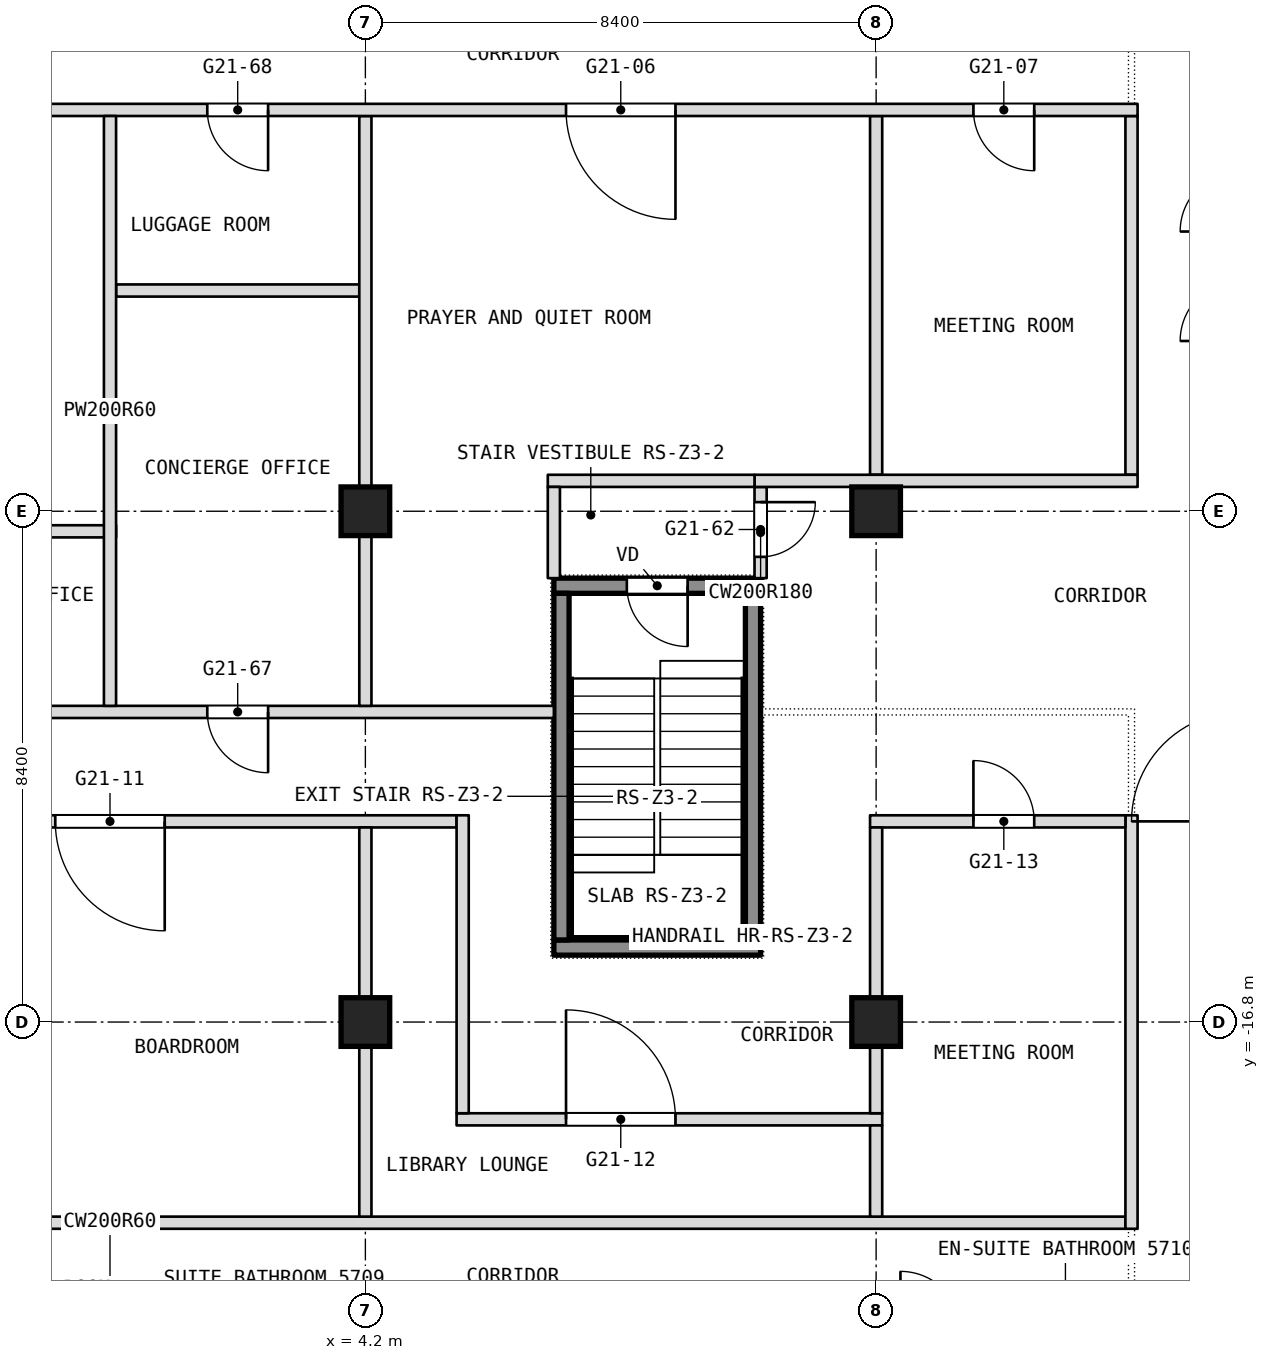
"""IFC4 building model, lengths in metres.
Left out: names, types, materials, properties, quantities, classifications, styles, units other than length and angle.
Written with IfcOpenShell. Run it as: python <this file> out.ifc"""

import sys

from ifc_helpers import new_model, si_unit, direction, frame, frame_2d, origin, origin_2d, place, context, subcontext, project, spatial, rectangle, extrude, element, fill, save


model = new_model("IFC4")
c1 = context("Model", 3, precision=1e-05, world=origin(), true_north=direction((0.0, 1.0)))
c2 = subcontext(c1, "Body", "Model", "MODEL_VIEW")
j1 = project(units=[si_unit("LENGTHUNIT", "METRE"), si_unit("PLANEANGLEUNIT", "RADIAN")], contexts=[c1])
p1 = place(None, origin())
s1 = spatial("IfcSite", under=j1, at=p1, CompositionType="ELEMENT")
p2 = place(p1, origin())
s2 = spatial("IfcBuilding", under=s1, at=p2, CompositionType="ELEMENT")
p3 = place(p2, frame((0.0, 0.0, 241.7)))
s3 = spatial("IfcBuildingStorey", under=s2, at=p3, CompositionType="ELEMENT", Elevation=241.7)
for number, where, z_axis, x_axis in (
    (1, (4.2, -16.8, 0.0), (0.0, 0.0, 1.0), (1.0, 0.0, 0.0)),
    (2, (4.2, -8.4, 0.0), (0.0, 0.0, 1.0), (1.0, 0.0, 0.0)),
    (3, (12.6, -16.8, 0.0), (0.0, 0.0, 1.0), (1.0, 0.0, 0.0)),
    (4, (12.6, -8.4, 0.0), (0.0, 0.0, 1.0), (1.0, 0.0, 0.0)),
):
    element("IfcColumn", number, at=place(p3, frame(where, z_axis=z_axis, x_axis=x_axis)), inside=s3, PredefinedType="COLUMN", context=c2, shape_type="SweptSolid", body=[
        extrude(rectangle(XDim=0.8, YDim=0.8, at=origin_2d()), origin(), (0.0, 0.0, 1.0), 3.6),
    ])
p4 = place(p3, frame((-16.7, -20.1, 0.0), z_axis=(0.0, 0.0, 1.0), x_axis=(1.0, 0.0, 0.0)))
e5 = element("IfcWall", 5, at=p4, inside=s3, PredefinedType="PARTITIONING", context=c2, shape_type="SweptSolid", body=[
    extrude(rectangle(XDim=33.4, YDim=0.2, at=frame_2d((16.7, 0.0))), origin(), (0.0, 0.0, 1.0), 3.34),
])
p5 = place(p3, frame((5.7, -18.4, 0.0), z_axis=(0.0, 0.0, 1.0), x_axis=(1.0, 0.0, 0.0)))
e6 = element("IfcWall", 6, at=p5, inside=s3, PredefinedType="PARTITIONING", context=c2, shape_type="SweptSolid", body=[
    extrude(rectangle(XDim=7.0, YDim=0.2, at=frame_2d((3.5, 0.0))), origin(), (0.0, 0.0, 1.0), 3.34),
])
p6 = place(p5, frame((1.8, 0.0, 0.0)))
e7 = element("IfcOpeningElement", 7, at=p6, cuts=e6, PredefinedType="OPENING", context=c2, shape_type="SweptSolid", body=[
    extrude(rectangle(XDim=1.8, YDim=2.1, at=frame_2d((0.9, 1.05))), frame((0.0, 0.1, 0.0), z_axis=(0.0, -1.0, 0.0), x_axis=(1.0, 0.0, 0.0)), (0.0, 0.0, 1.0), 0.2),
])
p7 = place(p3, frame((16.8, -20.2, 0.0), z_axis=(0.0, 0.0, 1.0), x_axis=(0.0, 1.0, 0.0)))
e8 = element("IfcWall", 8, at=p7, inside=s3, PredefinedType="PARTITIONING", context=c2, shape_type="SweptSolid", body=[
    extrude(rectangle(XDim=6.8, YDim=0.2, at=frame_2d((3.4, 0.0))), origin(), (0.0, 0.0, 1.0), 3.34),
])
p8 = place(p3, frame((16.8, -7.8, 0.0), z_axis=(0.0, 0.0, 1.0), x_axis=(0.0, 1.0, 0.0)))
e9 = element("IfcWall", 9, at=p8, inside=s3, PredefinedType="PARTITIONING", context=c2, shape_type="SweptSolid", body=[
    extrude(rectangle(XDim=5.9, YDim=0.2, at=frame_2d((2.95, 0.0))), origin(), (0.0, 0.0, 1.0), 3.34),
])
p9 = place(p3, frame((-5.9, -13.5, 0.0), z_axis=(0.0, 0.0, 1.0), x_axis=(1.0, 0.0, 0.0)))
e10 = element("IfcWall", 10, at=p9, inside=s3, PredefinedType="PARTITIONING", context=c2, shape_type="SweptSolid", body=[
    extrude(rectangle(XDim=11.6, YDim=0.2, at=frame_2d((5.8, 0.0))), origin(), (0.0, 0.0, 1.0), 3.34),
])
p10 = place(p9, frame((5.0, 0.0, 0.0)))
e11 = element("IfcOpeningElement", 11, at=p10, cuts=e10, PredefinedType="OPENING", context=c2, shape_type="SweptSolid", body=[
    extrude(rectangle(XDim=1.8, YDim=2.1, at=frame_2d((0.9, 1.05))), frame((0.0, 0.1, 0.0), z_axis=(0.0, -1.0, 0.0), x_axis=(1.0, 0.0, 0.0)), (0.0, 0.0, 1.0), 0.2),
])
p11 = place(p3, frame((12.5, -13.5, 0.0), z_axis=(0.0, 0.0, 1.0), x_axis=(1.0, 0.0, 0.0)))
e12 = element("IfcWall", 12, at=p11, inside=s3, PredefinedType="PARTITIONING", context=c2, shape_type="SweptSolid", body=[
    extrude(rectangle(XDim=4.2, YDim=0.2, at=frame_2d((2.1, 0.0))), origin(), (0.0, 0.0, 1.0), 3.34),
])
p12 = place(p11, frame((1.7, 0.0, 0.0)))
e13 = element("IfcOpeningElement", 13, at=p12, cuts=e12, PredefinedType="OPENING", context=c2, shape_type="SweptSolid", body=[
    extrude(rectangle(XDim=1.0, YDim=2.1, at=frame_2d((0.5, 1.05))), frame((0.0, 0.1, 0.0), z_axis=(0.0, -1.0, 0.0), x_axis=(1.0, 0.0, 0.0)), (0.0, 0.0, 1.0), 0.2),
])
p13 = place(p3, frame((12.6, -20.0, 0.0), z_axis=(0.0, 0.0, 1.0), x_axis=(0.0, 1.0, 0.0)))
e14 = element("IfcWall", 14, at=p13, inside=s3, PredefinedType="PARTITIONING", context=c2, shape_type="SweptSolid", body=[
    extrude(rectangle(XDim=1.5, YDim=0.2, at=frame_2d((0.75, 0.0))), origin(), (0.0, 0.0, 1.0), 3.34),
])
p14 = place(p3, frame((12.6, -7.8, 0.0), z_axis=(0.0, 0.0, 1.0), x_axis=(0.0, 1.0, 0.0)))
e15 = element("IfcWall", 15, at=p14, inside=s3, PredefinedType="PARTITIONING", context=c2, shape_type="SweptSolid", body=[
    extrude(rectangle(XDim=5.9, YDim=0.2, at=frame_2d((2.95, 0.0))), origin(), (0.0, 0.0, 1.0), 3.34),
])
p15 = place(p3, frame((12.6, -18.3, 0.0), z_axis=(0.0, 0.0, 1.0), x_axis=(0.0, 1.0, 0.0)))
e16 = element("IfcWall", 16, at=p15, inside=s3, PredefinedType="PARTITIONING", context=c2, shape_type="SweptSolid", body=[
    extrude(rectangle(XDim=4.7, YDim=0.2, at=frame_2d((2.35, 0.0))), origin(), (0.0, 0.0, 1.0), 3.34),
])
p16 = place(p3, frame((-7.3, -11.7, 0.0), z_axis=(0.0, 0.0, 1.0), x_axis=(1.0, 0.0, 0.0)))
e17 = element("IfcWall", 17, at=p16, inside=s3, PredefinedType="PARTITIONING", context=c2, shape_type="SweptSolid", body=[
    extrude(rectangle(XDim=14.6, YDim=0.2, at=frame_2d((7.3, 0.0))), origin(), (0.0, 0.0, 1.0), 3.34),
])
p17 = place(p16, frame((4.7, 0.0, 0.0)))
e18 = element("IfcOpeningElement", 18, at=p17, cuts=e17, PredefinedType="OPENING", context=c2, shape_type="SweptSolid", body=[
    extrude(rectangle(XDim=1.0, YDim=2.1, at=frame_2d((0.5, 1.05))), frame((0.0, 0.1, 0.0), z_axis=(0.0, -1.0, 0.0), x_axis=(1.0, 0.0, 0.0)), (0.0, 0.0, 1.0), 0.2),
])
p18 = place(p16, frame((8.9, 0.0, 0.0)))
e19 = element("IfcOpeningElement", 19, at=p18, cuts=e17, PredefinedType="OPENING", context=c2, shape_type="SweptSolid", body=[
    extrude(rectangle(XDim=1.0, YDim=2.1, at=frame_2d((0.5, 1.05))), frame((0.0, 0.1, 0.0), z_axis=(0.0, -1.0, 0.0), x_axis=(1.0, 0.0, 0.0)), (0.0, 0.0, 1.0), 0.2),
])
p19 = place(p3, frame((10.7, -9.5, 0.0), z_axis=(0.0, 0.0, 1.0), x_axis=(0.0, 1.0, 0.0)))
e20 = element("IfcWall", 20, at=p19, inside=s3, PredefinedType="PARTITIONING", context=c2, shape_type="SweptSolid", body=[
    extrude(rectangle(XDim=1.5, YDim=0.2, at=frame_2d((0.75, 0.0))), origin(), (0.0, 0.0, 1.0), 3.34),
])
p20 = place(p19, frame((0.35, 0.0, 0.0)))
e21 = element("IfcOpeningElement", 21, at=p20, cuts=e20, PredefinedType="OPENING", context=c2, shape_type="SweptSolid", body=[
    extrude(rectangle(XDim=0.9, YDim=2.1, at=frame_2d((0.45, 1.05))), frame((0.0, 0.1, 0.0), z_axis=(0.0, -1.0, 0.0), x_axis=(1.0, 0.0, 0.0)), (0.0, 0.0, 1.0), 0.2),
])
p21 = place(p3, frame((-4.1, -8.73, 0.0), z_axis=(0.0, 0.0, 1.0), x_axis=(1.0, 0.0, 0.0)))
e22 = element("IfcWall", 22, at=p21, inside=s3, PredefinedType="PARTITIONING", context=c2, shape_type="SweptSolid", body=[
    extrude(rectangle(XDim=4.2, YDim=0.2, at=frame_2d((2.1, 0.0))), origin(), (0.0, 0.0, 1.0), 3.34),
])
p22 = place(p3, frame((10.6, -7.9, 0.0), z_axis=(0.0, 0.0, 1.0), x_axis=(1.0, 0.0, 0.0)))
e23 = element("IfcWall", 23, at=p22, inside=s3, PredefinedType="PARTITIONING", context=c2, shape_type="SweptSolid", body=[
    extrude(rectangle(XDim=6.3, YDim=0.2, at=frame_2d((3.15, 0.0))), origin(), (0.0, 0.0, 1.0), 3.34),
])
p23 = place(p3, frame((7.2, -7.9, 0.0), z_axis=(0.0, 0.0, 1.0), x_axis=(1.0, 0.0, 0.0)))
e24 = element("IfcWall", 24, at=p23, inside=s3, PredefinedType="PARTITIONING", context=c2, shape_type="SweptSolid", body=[
    extrude(rectangle(XDim=3.4, YDim=0.2, at=frame_2d((1.7, 0.0))), origin(), (0.0, 0.0, 1.0), 3.34),
])
p24 = place(p3, frame((7.3, -9.5, 0.0), z_axis=(0.0, 0.0, 1.0), x_axis=(0.0, 1.0, 0.0)))
e25 = element("IfcWall", 25, at=p24, inside=s3, PredefinedType="PARTITIONING", context=c2, shape_type="SweptSolid", body=[
    extrude(rectangle(XDim=1.5, YDim=0.2, at=frame_2d((0.75, 0.0))), origin(), (0.0, 0.0, 1.0), 3.34),
])
p25 = place(p3, frame((5.8, -18.3, 0.0), z_axis=(0.0, 0.0, 1.0), x_axis=(0.0, 1.0, 0.0)))
e26 = element("IfcWall", 26, at=p25, inside=s3, PredefinedType="PARTITIONING", context=c2, shape_type="SweptSolid", body=[
    extrude(rectangle(XDim=4.9, YDim=0.2, at=frame_2d((2.45, 0.0))), origin(), (0.0, 0.0, 1.0), 3.34),
])
p26 = place(p3, frame((0.1, -4.77, 0.0), z_axis=(0.0, 0.0, 1.0), x_axis=(1.0, 0.0, 0.0)))
e27 = element("IfcWall", 27, at=p26, inside=s3, PredefinedType="PARTITIONING", context=c2, shape_type="SweptSolid", body=[
    extrude(rectangle(XDim=4.0, YDim=0.2, at=frame_2d((2.0, 0.0))), origin(), (0.0, 0.0, 1.0), 3.34),
])
p27 = place(p3, frame((4.2, -20.0, 0.0), z_axis=(0.0, 0.0, 1.0), x_axis=(0.0, 1.0, 0.0)))
e28 = element("IfcWall", 28, at=p27, inside=s3, PredefinedType="PARTITIONING", context=c2, shape_type="SweptSolid", body=[
    extrude(rectangle(XDim=6.4, YDim=0.2, at=frame_2d((3.2, 0.0))), origin(), (0.0, 0.0, 1.0), 3.34),
])
p28 = place(p3, frame((4.2, -11.6, 0.0), z_axis=(0.0, 0.0, 1.0), x_axis=(0.0, 1.0, 0.0)))
e29 = element("IfcWall", 29, at=p28, inside=s3, PredefinedType="PARTITIONING", context=c2, shape_type="SweptSolid", body=[
    extrude(rectangle(XDim=9.7, YDim=0.2, at=frame_2d((4.85, 0.0))), origin(), (0.0, 0.0, 1.0), 3.34),
])
p29 = place(p3, frame((-16.9, -1.8, 0.0), z_axis=(0.0, 0.0, 1.0), x_axis=(1.0, 0.0, 0.0)))
e30 = element("IfcWall", 30, at=p29, inside=s3, PredefinedType="PARTITIONING", context=c2, shape_type="SweptSolid", body=[
    extrude(rectangle(XDim=33.8, YDim=0.2, at=frame_2d((16.9, 0.0))), origin(), (0.0, 0.0, 1.0), 3.34),
])
p30 = place(p29, frame((1.7, 0.0, 0.0)))
e31 = element("IfcOpeningElement", 31, at=p30, cuts=e30, PredefinedType="OPENING", context=c2, shape_type="SweptSolid", body=[
    extrude(rectangle(XDim=1.0, YDim=2.1, at=frame_2d((0.5, 1.05))), frame((0.0, 0.1, 0.0), z_axis=(0.0, -1.0, 0.0), x_axis=(1.0, 0.0, 0.0)), (0.0, 0.0, 1.0), 0.2),
])
p31 = place(p29, frame((5.9, 0.0, 0.0)))
e32 = element("IfcOpeningElement", 32, at=p31, cuts=e30, PredefinedType="OPENING", context=c2, shape_type="SweptSolid", body=[
    extrude(rectangle(XDim=1.0, YDim=2.1, at=frame_2d((0.5, 1.05))), frame((0.0, 0.1, 0.0), z_axis=(0.0, -1.0, 0.0), x_axis=(1.0, 0.0, 0.0)), (0.0, 0.0, 1.0), 0.2),
])
p32 = place(p29, frame((10.1, 0.0, 0.0)))
e33 = element("IfcOpeningElement", 33, at=p32, cuts=e30, PredefinedType="OPENING", context=c2, shape_type="SweptSolid", body=[
    extrude(rectangle(XDim=1.0, YDim=2.1, at=frame_2d((0.5, 1.05))), frame((0.0, 0.1, 0.0), z_axis=(0.0, -1.0, 0.0), x_axis=(1.0, 0.0, 0.0)), (0.0, 0.0, 1.0), 0.2),
])
p33 = place(p29, frame((24.4, 0.0, 0.0)))
e34 = element("IfcOpeningElement", 34, at=p33, cuts=e30, PredefinedType="OPENING", context=c2, shape_type="SweptSolid", body=[
    extrude(rectangle(XDim=1.8, YDim=2.1, at=frame_2d((0.9, 1.05))), frame((0.0, 0.1, 0.0), z_axis=(0.0, -1.0, 0.0), x_axis=(1.0, 0.0, 0.0)), (0.0, 0.0, 1.0), 0.2),
])
p34 = place(p29, frame((31.1, 0.0, 0.0)))
e35 = element("IfcOpeningElement", 35, at=p34, cuts=e30, PredefinedType="OPENING", context=c2, shape_type="SweptSolid", body=[
    extrude(rectangle(XDim=1.0, YDim=2.1, at=frame_2d((0.5, 1.05))), frame((0.0, 0.1, 0.0), z_axis=(0.0, -1.0, 0.0), x_axis=(1.0, 0.0, 0.0)), (0.0, 0.0, 1.0), 0.2),
])
p35 = place(p29, frame((14.3, 0.0, 0.0)))
e36 = element("IfcOpeningElement", 36, at=p35, cuts=e30, PredefinedType="OPENING", context=c2, shape_type="SweptSolid", body=[
    extrude(rectangle(XDim=1.0, YDim=2.1, at=frame_2d((0.5, 1.05))), frame((0.0, 0.1, 0.0), z_axis=(0.0, -1.0, 0.0), x_axis=(1.0, 0.0, 0.0)), (0.0, 0.0, 1.0), 0.2),
])
p36 = place(p29, frame((18.5, 0.0, 0.0)))
e37 = element("IfcOpeningElement", 37, at=p36, cuts=e30, PredefinedType="OPENING", context=c2, shape_type="SweptSolid", body=[
    extrude(rectangle(XDim=1.0, YDim=2.1, at=frame_2d((0.5, 1.05))), frame((0.0, 0.1, 0.0), z_axis=(0.0, -1.0, 0.0), x_axis=(1.0, 0.0, 0.0)), (0.0, 0.0, 1.0), 0.2),
])
p37 = place(p3, frame((0.0, -11.6, 0.0), z_axis=(0.0, 0.0, 1.0), x_axis=(0.0, 1.0, 0.0)))
e38 = element("IfcWall", 38, at=p37, inside=s3, PredefinedType="PARTITIONING", context=c2, shape_type="SweptSolid", body=[
    extrude(rectangle(XDim=9.7, YDim=0.2, at=frame_2d((4.85, 0.0))), origin(), (0.0, 0.0, 1.0), 3.34),
])
p38 = place(p3, frame((7.3, -15.575, 0.1), z_axis=(0.0, 0.0, 1.0), x_axis=(1.0, 0.0, 0.0)))
e39 = element("IfcWall", 39, at=p38, inside=s3, PredefinedType="SHEAR", context=c2, shape_type="SweptSolid", body=[
    extrude(rectangle(XDim=3.4, YDim=0.25, at=frame_2d((1.7, 0.0))), origin(), (0.0, 0.0, 1.0), 3.6),
])
p39 = place(p3, frame((7.3, -9.625, 0.1), z_axis=(0.0, 0.0, 1.0), x_axis=(1.0, 0.0, 0.0)))
e40 = element("IfcWall", 40, at=p39, inside=s3, PredefinedType="SHEAR", context=c2, shape_type="SweptSolid", body=[
    extrude(rectangle(XDim=3.4, YDim=0.25, at=frame_2d((1.7, 0.0))), origin(), (0.0, 0.0, 1.0), 3.6),
])
p40 = place(p39, frame((1.2, 0.0, 0.0)))
e41 = element("IfcOpeningElement", 41, at=p40, cuts=e40, PredefinedType="OPENING", context=c2, shape_type="SweptSolid", body=[
    extrude(rectangle(XDim=1.0, YDim=2.1, at=frame_2d((0.5, 1.05))), frame((0.0, 0.125, 0.0), z_axis=(0.0, -1.0, 0.0), x_axis=(1.0, 0.0, 0.0)), (0.0, 0.0, 1.0), 0.25),
])
for number, where, z_axis, x_axis in (
    (42, (7.425, -15.45, 0.1), (0.0, 0.0, 1.0), (0.0, 1.0, 0.0)),
    (43, (10.575, -15.45, 0.1), (0.0, 0.0, 1.0), (0.0, 1.0, 0.0)),
):
    element("IfcWall", number, at=place(p3, frame(where, z_axis=z_axis, x_axis=x_axis)), inside=s3, PredefinedType="SHEAR", context=c2, shape_type="SweptSolid", body=[
        extrude(rectangle(XDim=5.7, YDim=0.25, at=frame_2d((2.85, 0.0))), origin(), (0.0, 0.0, 1.0), 3.6),
    ])
p41 = place(p6, origin())
e44 = element("IfcDoor", 44, at=p41, inside=s3, OperationType="DOUBLE_DOOR_SINGLE_SWING", PredefinedType="DOOR", context=c2, shape_type="SweptSolid", body=[
    extrude(rectangle(XDim=1.8, YDim=2.1, at=frame_2d((0.9, 1.05))), frame((0.0, 0.025, 0.0), z_axis=(0.0, -1.0, 0.0), x_axis=(1.0, 0.0, 0.0)), (0.0, 0.0, 1.0), 0.05),
])
fill(e7, e44)
p42 = place(p10, origin())
e45 = element("IfcDoor", 45, at=p42, inside=s3, OperationType="DOUBLE_DOOR_SINGLE_SWING", PredefinedType="DOOR", context=c2, shape_type="SweptSolid", body=[
    extrude(rectangle(XDim=1.8, YDim=2.1, at=frame_2d((0.9, 1.05))), frame((0.0, 0.025, 0.0), z_axis=(0.0, -1.0, 0.0), x_axis=(1.0, 0.0, 0.0)), (0.0, 0.0, 1.0), 0.05),
])
fill(e11, e45)
p43 = place(p12, origin())
e46 = element("IfcDoor", 46, at=p43, inside=s3, OperationType="SINGLE_SWING_LEFT", PredefinedType="DOOR", context=c2, shape_type="SweptSolid", body=[
    extrude(rectangle(XDim=1.0, YDim=2.1, at=frame_2d((0.5, 1.05))), frame((0.0, 0.025, 0.0), z_axis=(0.0, -1.0, 0.0), x_axis=(1.0, 0.0, 0.0)), (0.0, 0.0, 1.0), 0.05),
])
fill(e13, e46)
p44 = place(p18, origin())
e47 = element("IfcDoor", 47, at=p44, inside=s3, OperationType="SINGLE_SWING_LEFT", PredefinedType="DOOR", context=c2, shape_type="SweptSolid", body=[
    extrude(rectangle(XDim=1.0, YDim=2.1, at=frame_2d((0.5, 1.05))), frame((0.0, 0.025, 0.0), z_axis=(0.0, -1.0, 0.0), x_axis=(1.0, 0.0, 0.0)), (0.0, 0.0, 1.0), 0.05),
])
fill(e19, e47)
p45 = place(p20, origin())
e48 = element("IfcDoor", 48, at=p45, inside=s3, OperationType="SINGLE_SWING_RIGHT", PredefinedType="DOOR", context=c2, shape_type="SweptSolid", body=[
    extrude(rectangle(XDim=0.9, YDim=2.1, at=frame_2d((0.45, 1.05))), frame((0.0, 0.025, 0.0), z_axis=(0.0, -1.0, 0.0), x_axis=(1.0, 0.0, 0.0)), (0.0, 0.0, 1.0), 0.05),
])
fill(e21, e48)
p46 = place(p33, origin())
e49 = element("IfcDoor", 49, at=p46, inside=s3, OperationType="DOUBLE_DOOR_SINGLE_SWING", PredefinedType="DOOR", context=c2, shape_type="SweptSolid", body=[
    extrude(rectangle(XDim=1.8, YDim=2.1, at=frame_2d((0.9, 1.05))), frame((0.0, 0.025, 0.0), z_axis=(0.0, -1.0, 0.0), x_axis=(1.0, 0.0, 0.0)), (0.0, 0.0, 1.0), 0.05),
])
fill(e34, e49)
p47 = place(p34, origin())
e50 = element("IfcDoor", 50, at=p47, inside=s3, OperationType="SINGLE_SWING_RIGHT", PredefinedType="DOOR", context=c2, shape_type="SweptSolid", body=[
    extrude(rectangle(XDim=1.0, YDim=2.1, at=frame_2d((0.5, 1.05))), frame((0.0, 0.025, 0.0), z_axis=(0.0, -1.0, 0.0), x_axis=(1.0, 0.0, 0.0)), (0.0, 0.0, 1.0), 0.05),
])
fill(e35, e50)
p48 = place(p36, origin())
e51 = element("IfcDoor", 51, at=p48, inside=s3, OperationType="SINGLE_SWING_LEFT", PredefinedType="DOOR", context=c2, shape_type="SweptSolid", body=[
    extrude(rectangle(XDim=1.0, YDim=2.1, at=frame_2d((0.5, 1.05))), frame((0.0, 0.025, 0.0), z_axis=(0.0, -1.0, 0.0), x_axis=(1.0, 0.0, 0.0)), (0.0, 0.0, 1.0), 0.05),
])
fill(e37, e51)
p49 = place(p40, origin())
e52 = element("IfcDoor", 52, at=p49, inside=s3, OperationType="SINGLE_SWING_LEFT", PredefinedType="DOOR", context=c2, shape_type="SweptSolid", body=[
    extrude(rectangle(XDim=1.0, YDim=2.1, at=frame_2d((0.5, 1.05))), frame((0.0, 0.025, 0.0), z_axis=(0.0, -1.0, 0.0), x_axis=(1.0, 0.0, 0.0)), (0.0, 0.0, 1.0), 0.05),
])
fill(e41, e52)
save(model, sys.argv[1])
